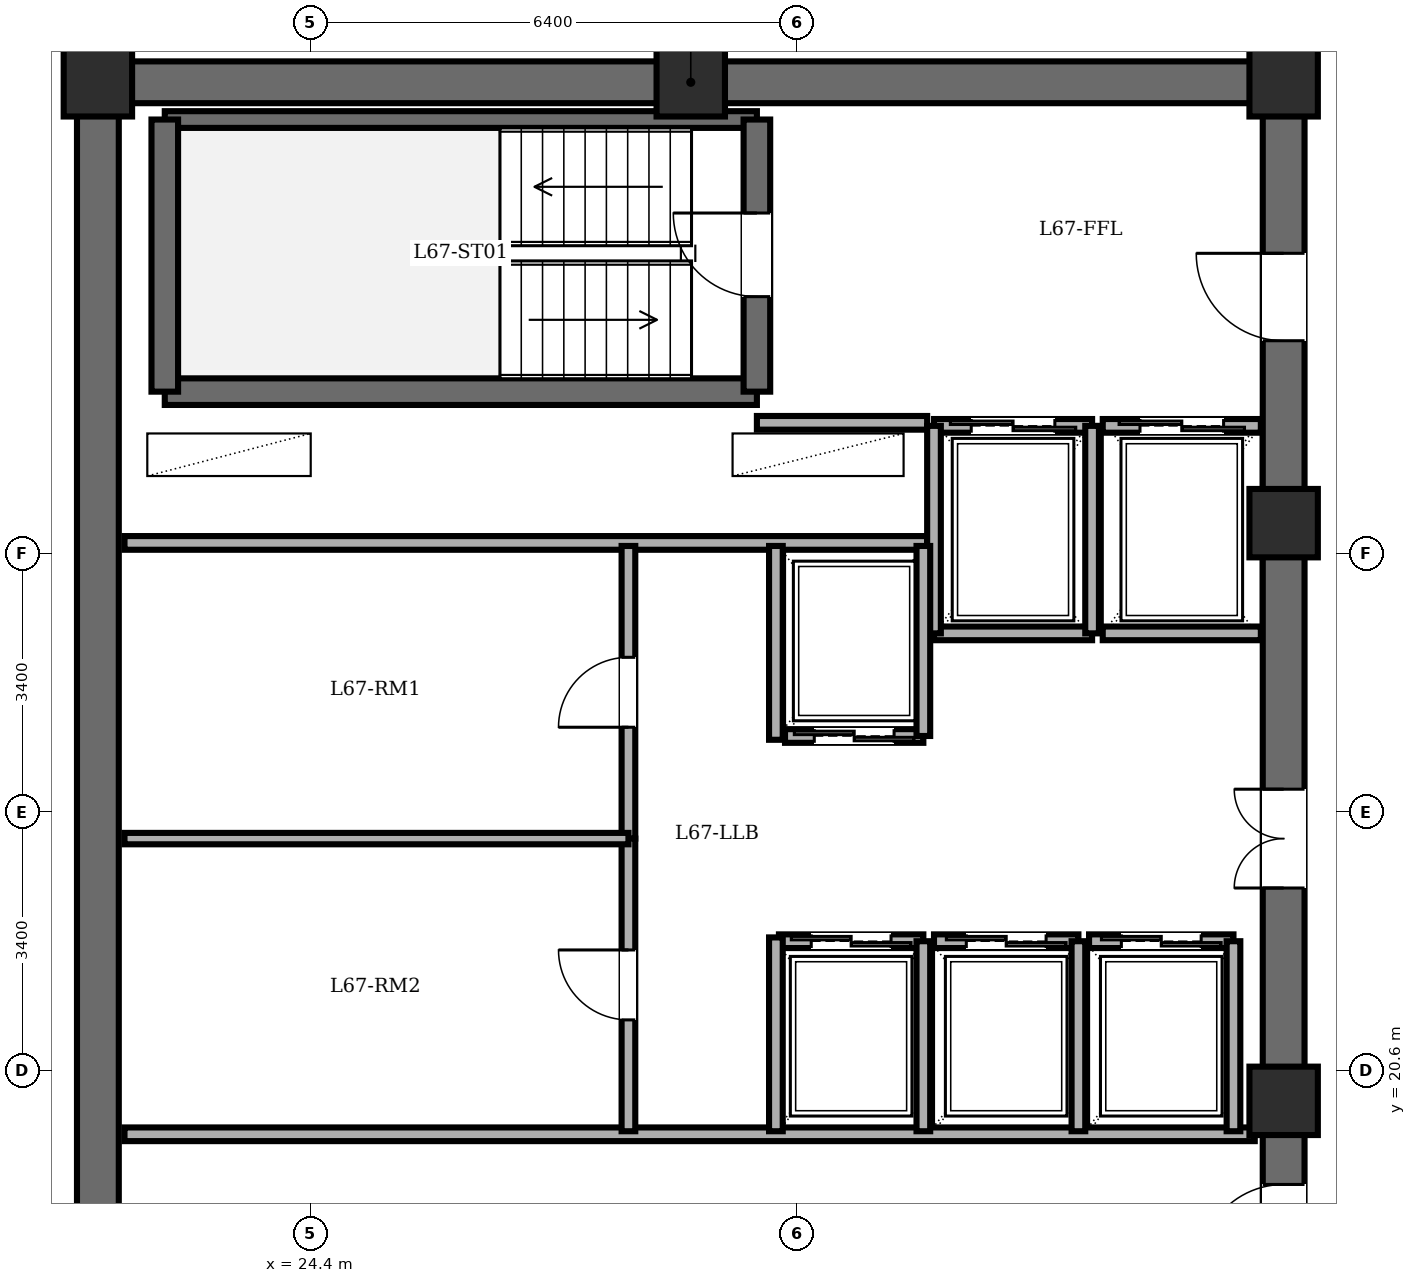
"""IFC4 building model, lengths in metres.
Left out: names, types, materials, properties, quantities, classifications, styles, units other than length and angle.
Written with IfcOpenShell. Run it as: python <this file> out.ifc"""

import sys

from ifc_helpers import new_model, si_unit, direction, frame, frame_2d, origin, origin_2d, place, context, subcontext, project, spatial, rectangle, extrude, element, fill, save


model = new_model("IFC4")
c1 = context("Model", 3, precision=1e-05, world=origin(), true_north=direction((0.0, 1.0)))
c2 = subcontext(c1, "Body", "Model", "MODEL_VIEW")
j1 = project(units=[si_unit("LENGTHUNIT", "METRE"), si_unit("PLANEANGLEUNIT", "RADIAN")], contexts=[c1])
p1 = place(None, origin())
s1 = spatial("IfcSite", under=j1, at=p1, CompositionType="ELEMENT")
p2 = place(p1, origin())
s2 = spatial("IfcBuilding", under=s1, at=p2, CompositionType="ELEMENT")
p3 = place(p2, frame((0.0, 0.0, 258.8)))
s3 = spatial("IfcBuildingStorey", under=s2, at=p3, CompositionType="ELEMENT", Elevation=258.8)
for number, where, z_axis, x_axis in (
    (1, (37.2, 20.2, 0.0), (0.0, 0.0, 1.0), (1.0, 0.0, 0.0)),
    (2, (37.2, 27.8, 0.0), (0.0, 0.0, 1.0), (1.0, 0.0, 0.0)),
    (3, (37.2, 33.6, 0.0), (0.0, 0.0, 1.0), (1.0, 0.0, 0.0)),
    (4, (29.4, 33.6, 0.0), (0.0, 0.0, 1.0), (1.0, 0.0, 0.0)),
    (5, (21.6, 33.6, 0.0), (0.0, 0.0, 1.0), (1.0, 0.0, 0.0)),
):
    element("IfcColumn", number, at=place(p3, frame(where, z_axis=z_axis, x_axis=x_axis)), inside=s3, PredefinedType="COLUMN", context=c2, shape_type="SweptSolid", body=[
        extrude(rectangle(XDim=0.9, YDim=0.9, at=origin_2d()), origin(), (0.0, 0.0, 1.0), 3.65),
    ])
p4 = place(p3, frame((21.6, 14.4, 0.0), z_axis=(0.0, 0.0, 1.0), x_axis=(0.0, 1.0, 0.0)))
e6 = element("IfcWall", 6, at=p4, inside=s3, PredefinedType="SHEAR", context=c2, shape_type="SweptSolid", body=[
    extrude(rectangle(XDim=19.2, YDim=0.55, at=frame_2d((9.6, 0.0))), origin(), (0.0, 0.0, 1.0), 3.45),
])
p5 = place(p3, frame((21.6, 33.6, 0.0), z_axis=(0.0, 0.0, 1.0), x_axis=(1.0, 0.0, 0.0)))
e7 = element("IfcWall", 7, at=p5, inside=s3, PredefinedType="SHEAR", context=c2, shape_type="SweptSolid", body=[
    extrude(rectangle(XDim=15.6, YDim=0.55, at=frame_2d((7.8, 0.0))), origin(), (0.0, 0.0, 1.0), 3.45),
])
p6 = place(p3, frame((37.2, 14.4, 0.0), z_axis=(0.0, 0.0, 1.0), x_axis=(0.0, 1.0, 0.0)))
e8 = element("IfcWall", 8, at=p6, inside=s3, PredefinedType="SHEAR", context=c2, shape_type="SweptSolid", body=[
    extrude(rectangle(XDim=19.2, YDim=0.55, at=frame_2d((9.6, 0.0))), origin(), (0.0, 0.0, 1.0), 3.45),
])
p7 = place(p6, frame((15.8, 0.0, 0.0)))
e9 = element("IfcOpeningElement", 9, at=p7, cuts=e8, PredefinedType="OPENING", context=c2, shape_type="SweptSolid", body=[
    extrude(rectangle(XDim=1.15, YDim=2.15, at=frame_2d((0.575, 1.075))), frame((0.0, 0.285, 0.0), z_axis=(0.0, -1.0, 0.0), x_axis=(1.0, 0.0, 0.0)), (0.0, 0.0, 1.0), 0.57),
])
p8 = place(p6, frame((3.6, 0.0, 0.0)))
e10 = element("IfcOpeningElement", 10, at=p8, cuts=e8, PredefinedType="OPENING", context=c2, shape_type="SweptSolid", body=[
    extrude(rectangle(XDim=1.1, YDim=2.15, at=frame_2d((0.55, 1.075))), frame((0.0, 0.285, 0.0), z_axis=(0.0, -1.0, 0.0), x_axis=(1.0, 0.0, 0.0)), (0.0, 0.0, 1.0), 0.57),
])
p9 = place(p6, frame((8.6, 0.0, 0.0)))
e11 = element("IfcOpeningElement", 11, at=p9, cuts=e8, PredefinedType="OPENING", context=c2, shape_type="SweptSolid", body=[
    extrude(rectangle(XDim=1.3, YDim=2.2, at=frame_2d((0.65, 1.1))), frame((0.0, 0.285, 0.0), z_axis=(0.0, -1.0, 0.0), x_axis=(1.0, 0.0, 0.0)), (0.0, 0.0, 1.0), 0.57),
])
p10 = place(p3, frame((22.48, 29.53, 0.0), z_axis=(0.0, 0.0, 1.0), x_axis=(1.0, 0.0, 0.0)))
e12 = element("IfcWall", 12, at=p10, inside=s3, PredefinedType="SOLIDWALL", context=c2, shape_type="SweptSolid", body=[
    extrude(rectangle(XDim=7.79, YDim=0.35, at=frame_2d((3.895, 0.0))), origin(), (0.0, 0.0, 1.0), 3.45),
])
p11 = place(p3, frame((22.48, 33.11, 0.0), z_axis=(0.0, 0.0, 1.0), x_axis=(1.0, 0.0, 0.0)))
e13 = element("IfcWall", 13, at=p11, inside=s3, PredefinedType="PARTITIONING", context=c2, shape_type="SweptSolid", body=[
    extrude(rectangle(XDim=7.79, YDim=0.22, at=frame_2d((3.895, 0.0))), origin(), (0.0, 0.0, 1.0), 3.45),
])
p12 = place(p3, frame((22.48, 29.53, 0.0), z_axis=(0.0, 0.0, 1.0), x_axis=(0.0, 1.0, 0.0)))
e14 = element("IfcWall", 14, at=p12, inside=s3, PredefinedType="SOLIDWALL", context=c2, shape_type="SweptSolid", body=[
    extrude(rectangle(XDim=3.58, YDim=0.35, at=frame_2d((1.79, 0.0))), origin(), (0.0, 0.0, 1.0), 3.45),
])
p13 = place(p3, frame((30.27, 29.53, 0.0), z_axis=(0.0, 0.0, 1.0), x_axis=(0.0, 1.0, 0.0)))
e15 = element("IfcWall", 15, at=p13, inside=s3, PredefinedType="SOLIDWALL", context=c2, shape_type="SweptSolid", body=[
    extrude(rectangle(XDim=3.58, YDim=0.35, at=frame_2d((1.79, 0.0))), origin(), (0.0, 0.0, 1.0), 3.45),
])
p14 = place(p13, frame((1.25, 0.0, 0.0)))
e16 = element("IfcOpeningElement", 16, at=p14, cuts=e15, PredefinedType="OPENING", context=c2, shape_type="SweptSolid", body=[
    extrude(rectangle(XDim=1.1, YDim=2.15, at=frame_2d((0.55, 1.075))), frame((0.0, 0.185, 0.0), z_axis=(0.0, -1.0, 0.0), x_axis=(1.0, 0.0, 0.0)), (0.0, 0.0, 1.0), 0.37),
])
p15 = place(p3, frame((30.27, 29.12, 0.0), z_axis=(0.0, 0.0, 1.0), x_axis=(1.0, 0.0, 0.0)))
e17 = element("IfcWall", 17, at=p15, inside=s3, PredefinedType="PARTITIONING", context=c2, shape_type="SweptSolid", body=[
    extrude(rectangle(XDim=2.24, YDim=0.18, at=frame_2d((1.12, 0.0))), origin(), (0.0, 0.0, 1.0), 3.45),
])
p16 = place(p3, frame((21.95, 27.54, 0.0), z_axis=(0.0, 0.0, 1.0), x_axis=(1.0, 0.0, 0.0)))
e18 = element("IfcWall", 18, at=p16, inside=s3, PredefinedType="PARTITIONING", context=c2, shape_type="SweptSolid", body=[
    extrude(rectangle(XDim=10.56, YDim=0.18, at=frame_2d((5.28, 0.0))), origin(), (0.0, 0.0, 1.0), 3.45),
])
p17 = place(p3, frame((21.95, 19.76, 0.0), z_axis=(0.0, 0.0, 1.0), x_axis=(1.0, 0.0, 0.0)))
e19 = element("IfcWall", 19, at=p17, inside=s3, PredefinedType="PARTITIONING", context=c2, shape_type="SweptSolid", body=[
    extrude(rectangle(XDim=14.87, YDim=0.18, at=frame_2d((7.435, 0.0))), origin(), (0.0, 0.0, 1.0), 3.45),
])
p18 = place(p3, frame((32.6, 29.08, 0.0), z_axis=(0.0, 0.0, 1.0), x_axis=(1.0, 0.0, 0.0)))
e20 = element("IfcWall", 20, at=p18, inside=s3, PredefinedType="PARTITIONING", context=c2, shape_type="SweptSolid", body=[
    extrude(rectangle(XDim=2.08, YDim=0.18, at=frame_2d((1.04, 0.0))), origin(), (0.0, 0.0, 1.0), 3.45),
])
p19 = place(p18, frame((0.49, 0.0, 0.0)))
e21 = element("IfcOpeningElement", 21, at=p19, cuts=e20, PredefinedType="OPENING", context=c2, shape_type="SweptSolid", body=[
    extrude(rectangle(XDim=1.1, YDim=2.2, at=frame_2d((0.55, 1.1))), frame((0.0, 0.1, 0.0), z_axis=(0.0, -1.0, 0.0), x_axis=(1.0, 0.0, 0.0)), (0.0, 0.0, 1.0), 0.2),
])
p20 = place(p3, frame((34.68, 26.35, 0.0), z_axis=(0.0, 0.0, 1.0), x_axis=(-1.0, 0.0, 0.0)))
e22 = element("IfcWall", 22, at=p20, inside=s3, PredefinedType="PARTITIONING", context=c2, shape_type="SweptSolid", body=[
    extrude(rectangle(XDim=2.08, YDim=0.18, at=frame_2d((1.04, 0.0))), origin(), (0.0, 0.0, 1.0), 3.45),
])
for number, where, z_axis, x_axis in (
    (23, (34.68, 26.35, 0.0), (0.0, 0.0, 1.0), (0.0, 1.0, 0.0)),
    (24, (32.6, 29.08, 0.0), (0.0, 0.0, 1.0), (0.0, -1.0, 0.0)),
):
    element("IfcWall", number, at=place(p3, frame(where, z_axis=z_axis, x_axis=x_axis)), inside=s3, PredefinedType="PARTITIONING", context=c2, shape_type="SweptSolid", body=[
        extrude(rectangle(XDim=2.73, YDim=0.18, at=frame_2d((1.365, 0.0))), origin(), (0.0, 0.0, 1.0), 3.45),
    ])
p21 = place(p3, frame((34.82, 29.08, 0.0), z_axis=(0.0, 0.0, 1.0), x_axis=(1.0, 0.0, 0.0)))
e25 = element("IfcWall", 25, at=p21, inside=s3, PredefinedType="PARTITIONING", context=c2, shape_type="SweptSolid", body=[
    extrude(rectangle(XDim=2.08, YDim=0.18, at=frame_2d((1.04, 0.0))), origin(), (0.0, 0.0, 1.0), 3.45),
])
p22 = place(p21, frame((0.49, 0.0, 0.0)))
e26 = element("IfcOpeningElement", 26, at=p22, cuts=e25, PredefinedType="OPENING", context=c2, shape_type="SweptSolid", body=[
    extrude(rectangle(XDim=1.1, YDim=2.2, at=frame_2d((0.55, 1.1))), frame((0.0, 0.1, 0.0), z_axis=(0.0, -1.0, 0.0), x_axis=(1.0, 0.0, 0.0)), (0.0, 0.0, 1.0), 0.2),
])
p23 = place(p3, frame((36.9, 26.35, 0.0), z_axis=(0.0, 0.0, 1.0), x_axis=(-1.0, 0.0, 0.0)))
e27 = element("IfcWall", 27, at=p23, inside=s3, PredefinedType="PARTITIONING", context=c2, shape_type="SweptSolid", body=[
    extrude(rectangle(XDim=2.08, YDim=0.18, at=frame_2d((1.04, 0.0))), origin(), (0.0, 0.0, 1.0), 3.45),
])
p24 = place(p3, frame((32.46, 25.0, 0.0), z_axis=(0.0, 0.0, 1.0), x_axis=(-1.0, 0.0, 0.0)))
e28 = element("IfcWall", 28, at=p24, inside=s3, PredefinedType="PARTITIONING", context=c2, shape_type="SweptSolid", body=[
    extrude(rectangle(XDim=1.82, YDim=0.18, at=frame_2d((0.91, 0.0))), origin(), (0.0, 0.0, 1.0), 3.45),
])
p25 = place(p24, frame((0.385, 0.0, 0.0)))
e29 = element("IfcOpeningElement", 29, at=p25, cuts=e28, PredefinedType="OPENING", context=c2, shape_type="SweptSolid", body=[
    extrude(rectangle(XDim=1.05, YDim=2.2, at=frame_2d((0.525, 1.1))), frame((0.0, 0.1, 0.0), z_axis=(0.0, -1.0, 0.0), x_axis=(1.0, 0.0, 0.0)), (0.0, 0.0, 1.0), 0.2),
])
p26 = place(p3, frame((32.46, 25.0, 0.0), z_axis=(0.0, 0.0, 1.0), x_axis=(0.0, 1.0, 0.0)))
e30 = element("IfcWall", 30, at=p26, inside=s3, PredefinedType="PARTITIONING", context=c2, shape_type="SweptSolid", body=[
    extrude(rectangle(XDim=2.5, YDim=0.18, at=frame_2d((1.25, 0.0))), origin(), (0.0, 0.0, 1.0), 3.45),
])
p27 = place(p3, frame((30.56, 22.3, 0.0), z_axis=(0.0, 0.0, 1.0), x_axis=(1.0, 0.0, 0.0)))
e31 = element("IfcWall", 31, at=p27, inside=s3, PredefinedType="PARTITIONING", context=c2, shape_type="SweptSolid", body=[
    extrude(rectangle(XDim=1.9, YDim=0.18, at=frame_2d((0.95, 0.0))), origin(), (0.0, 0.0, 1.0), 3.45),
])
p28 = place(p27, frame((0.425, 0.0, 0.0)))
e32 = element("IfcOpeningElement", 32, at=p28, cuts=e31, PredefinedType="OPENING", context=c2, shape_type="SweptSolid", body=[
    extrude(rectangle(XDim=1.05, YDim=2.2, at=frame_2d((0.525, 1.1))), frame((0.0, 0.1, 0.0), z_axis=(0.0, -1.0, 0.0), x_axis=(1.0, 0.0, 0.0)), (0.0, 0.0, 1.0), 0.2),
])
p29 = place(p3, frame((32.46, 19.8, 0.0), z_axis=(0.0, 0.0, 1.0), x_axis=(0.0, 1.0, 0.0)))
e33 = element("IfcWall", 33, at=p29, inside=s3, PredefinedType="PARTITIONING", context=c2, shape_type="SweptSolid", body=[
    extrude(rectangle(XDim=2.5, YDim=0.18, at=frame_2d((1.25, 0.0))), origin(), (0.0, 0.0, 1.0), 3.45),
])
p30 = place(p3, frame((32.6, 22.3, 0.0), z_axis=(0.0, 0.0, 1.0), x_axis=(1.0, 0.0, 0.0)))
e34 = element("IfcWall", 34, at=p30, inside=s3, PredefinedType="PARTITIONING", context=c2, shape_type="SweptSolid", body=[
    extrude(rectangle(XDim=1.9, YDim=0.18, at=frame_2d((0.95, 0.0))), origin(), (0.0, 0.0, 1.0), 3.45),
])
p31 = place(p30, frame((0.425, 0.0, 0.0)))
e35 = element("IfcOpeningElement", 35, at=p31, cuts=e34, PredefinedType="OPENING", context=c2, shape_type="SweptSolid", body=[
    extrude(rectangle(XDim=1.05, YDim=2.2, at=frame_2d((0.525, 1.1))), frame((0.0, 0.1, 0.0), z_axis=(0.0, -1.0, 0.0), x_axis=(1.0, 0.0, 0.0)), (0.0, 0.0, 1.0), 0.2),
])
p32 = place(p3, frame((34.5, 19.8, 0.0), z_axis=(0.0, 0.0, 1.0), x_axis=(0.0, 1.0, 0.0)))
e36 = element("IfcWall", 36, at=p32, inside=s3, PredefinedType="PARTITIONING", context=c2, shape_type="SweptSolid", body=[
    extrude(rectangle(XDim=2.5, YDim=0.18, at=frame_2d((1.25, 0.0))), origin(), (0.0, 0.0, 1.0), 3.45),
])
p33 = place(p3, frame((34.64, 22.3, 0.0), z_axis=(0.0, 0.0, 1.0), x_axis=(1.0, 0.0, 0.0)))
e37 = element("IfcWall", 37, at=p33, inside=s3, PredefinedType="PARTITIONING", context=c2, shape_type="SweptSolid", body=[
    extrude(rectangle(XDim=1.9, YDim=0.18, at=frame_2d((0.95, 0.0))), origin(), (0.0, 0.0, 1.0), 3.45),
])
p34 = place(p33, frame((0.425, 0.0, 0.0)))
e38 = element("IfcOpeningElement", 38, at=p34, cuts=e37, PredefinedType="OPENING", context=c2, shape_type="SweptSolid", body=[
    extrude(rectangle(XDim=1.05, YDim=2.2, at=frame_2d((0.525, 1.1))), frame((0.0, 0.1, 0.0), z_axis=(0.0, -1.0, 0.0), x_axis=(1.0, 0.0, 0.0)), (0.0, 0.0, 1.0), 0.2),
])
p35 = place(p3, frame((36.54, 19.8, 0.0), z_axis=(0.0, 0.0, 1.0), x_axis=(0.0, 1.0, 0.0)))
e39 = element("IfcWall", 39, at=p35, inside=s3, PredefinedType="PARTITIONING", context=c2, shape_type="SweptSolid", body=[
    extrude(rectangle(XDim=2.5, YDim=0.18, at=frame_2d((1.25, 0.0))), origin(), (0.0, 0.0, 1.0), 3.45),
])
for number, where, z_axis, x_axis in (
    (40, (30.52, 24.95, 0.0), (0.0, 0.0, 1.0), (0.0, 1.0, 0.0)),
    (41, (30.52, 19.8, 0.0), (0.0, 0.0, 1.0), (0.0, 1.0, 0.0)),
):
    element("IfcWall", number, at=place(p3, frame(where, z_axis=z_axis, x_axis=x_axis)), inside=s3, PredefinedType="PARTITIONING", context=c2, shape_type="SweptSolid", body=[
        extrude(rectangle(XDim=2.55, YDim=0.18, at=frame_2d((1.275, 0.0))), origin(), (0.0, 0.0, 1.0), 3.45),
    ])
p36 = place(p3, frame((28.58, 23.65, 0.0), z_axis=(0.0, 0.0, 1.0), x_axis=(0.0, 1.0, 0.0)))
e42 = element("IfcWall", 42, at=p36, inside=s3, PredefinedType="PARTITIONING", context=c2, shape_type="SweptSolid", body=[
    extrude(rectangle(XDim=3.85, YDim=0.18, at=frame_2d((1.925, 0.0))), origin(), (0.0, 0.0, 1.0), 3.45),
])
p37 = place(p36, frame((1.465, 0.0, 0.0)))
e43 = element("IfcOpeningElement", 43, at=p37, cuts=e42, PredefinedType="OPENING", context=c2, shape_type="SweptSolid", body=[
    extrude(rectangle(XDim=0.92, YDim=2.1, at=frame_2d((0.46, 1.05))), frame((0.0, 0.1, 0.0), z_axis=(0.0, -1.0, 0.0), x_axis=(1.0, 0.0, 0.0)), (0.0, 0.0, 1.0), 0.2),
])
p38 = place(p3, frame((28.58, 19.8, 0.0), z_axis=(0.0, 0.0, 1.0), x_axis=(0.0, 1.0, 0.0)))
e44 = element("IfcWall", 44, at=p38, inside=s3, PredefinedType="PARTITIONING", context=c2, shape_type="SweptSolid", body=[
    extrude(rectangle(XDim=3.85, YDim=0.18, at=frame_2d((1.925, 0.0))), origin(), (0.0, 0.0, 1.0), 3.45),
])
p39 = place(p38, frame((1.465, 0.0, 0.0)))
e45 = element("IfcOpeningElement", 45, at=p39, cuts=e44, PredefinedType="OPENING", context=c2, shape_type="SweptSolid", body=[
    extrude(rectangle(XDim=0.92, YDim=2.1, at=frame_2d((0.46, 1.05))), frame((0.0, 0.1, 0.0), z_axis=(0.0, -1.0, 0.0), x_axis=(1.0, 0.0, 0.0)), (0.0, 0.0, 1.0), 0.2),
])
p40 = place(p3, frame((21.95, 23.65, 0.0), z_axis=(0.0, 0.0, 1.0), x_axis=(1.0, 0.0, 0.0)))
e46 = element("IfcWall", 46, at=p40, inside=s3, PredefinedType="PARTITIONING", context=c2, shape_type="SweptSolid", body=[
    extrude(rectangle(XDim=6.63, YDim=0.15, at=frame_2d((3.315, 0.0))), origin(), (0.0, 0.0, 1.0), 3.45),
])
p41 = place(p14, origin())
e47 = element("IfcDoor", 47, at=p41, inside=s3, OperationType="SINGLE_SWING_RIGHT", PredefinedType="DOOR", context=c2, shape_type="SweptSolid", body=[
    extrude(rectangle(XDim=1.1, YDim=2.15, at=frame_2d((0.55, 1.075))), frame((0.0, 0.025, 0.0), z_axis=(0.0, -1.0, 0.0), x_axis=(1.0, 0.0, 0.0)), (0.0, 0.0, 1.0), 0.05),
])
fill(e16, e47)
p42 = place(p7, origin())
e48 = element("IfcDoor", 48, at=p42, inside=s3, OperationType="SINGLE_SWING_RIGHT", PredefinedType="DOOR", context=c2, shape_type="SweptSolid", body=[
    extrude(rectangle(XDim=1.15, YDim=2.15, at=frame_2d((0.575, 1.075))), frame((0.0, 0.025, 0.0), z_axis=(0.0, -1.0, 0.0), x_axis=(1.0, 0.0, 0.0)), (0.0, 0.0, 1.0), 0.05),
])
fill(e9, e48)
p43 = place(p8, origin())
e49 = element("IfcDoor", 49, at=p43, inside=s3, OperationType="SINGLE_SWING_LEFT", PredefinedType="DOOR", context=c2, shape_type="SweptSolid", body=[
    extrude(rectangle(XDim=1.1, YDim=2.15, at=frame_2d((0.55, 1.075))), frame((0.0, 0.025, 0.0), z_axis=(0.0, -1.0, 0.0), x_axis=(1.0, 0.0, 0.0)), (0.0, 0.0, 1.0), 0.05),
])
fill(e10, e49)
p44 = place(p19, origin())
e50 = element("IfcDoor", 50, at=p44, inside=s3, OperationType="DOUBLE_DOOR_SLIDING", PredefinedType="DOOR", context=c2, shape_type="SweptSolid", body=[
    extrude(rectangle(XDim=1.1, YDim=2.2, at=frame_2d((0.55, 1.1))), frame((0.0, 0.025, 0.0), z_axis=(0.0, -1.0, 0.0), x_axis=(1.0, 0.0, 0.0)), (0.0, 0.0, 1.0), 0.05),
])
fill(e21, e50)
p45 = place(p22, origin())
e51 = element("IfcDoor", 51, at=p45, inside=s3, OperationType="DOUBLE_DOOR_SLIDING", PredefinedType="DOOR", context=c2, shape_type="SweptSolid", body=[
    extrude(rectangle(XDim=1.1, YDim=2.2, at=frame_2d((0.55, 1.1))), frame((0.0, 0.025, 0.0), z_axis=(0.0, -1.0, 0.0), x_axis=(1.0, 0.0, 0.0)), (0.0, 0.0, 1.0), 0.05),
])
fill(e26, e51)
p46 = place(p25, origin())
e52 = element("IfcDoor", 52, at=p46, inside=s3, OperationType="DOUBLE_DOOR_SLIDING", PredefinedType="DOOR", context=c2, shape_type="SweptSolid", body=[
    extrude(rectangle(XDim=1.05, YDim=2.2, at=frame_2d((0.525, 1.1))), frame((0.0, 0.025, 0.0), z_axis=(0.0, -1.0, 0.0), x_axis=(1.0, 0.0, 0.0)), (0.0, 0.0, 1.0), 0.05),
])
fill(e29, e52)
p47 = place(p28, origin())
e53 = element("IfcDoor", 53, at=p47, inside=s3, OperationType="DOUBLE_DOOR_SLIDING", PredefinedType="DOOR", context=c2, shape_type="SweptSolid", body=[
    extrude(rectangle(XDim=1.05, YDim=2.2, at=frame_2d((0.525, 1.1))), frame((0.0, 0.025, 0.0), z_axis=(0.0, -1.0, 0.0), x_axis=(1.0, 0.0, 0.0)), (0.0, 0.0, 1.0), 0.05),
])
fill(e32, e53)
p48 = place(p31, origin())
e54 = element("IfcDoor", 54, at=p48, inside=s3, OperationType="DOUBLE_DOOR_SLIDING", PredefinedType="DOOR", context=c2, shape_type="SweptSolid", body=[
    extrude(rectangle(XDim=1.05, YDim=2.2, at=frame_2d((0.525, 1.1))), frame((0.0, 0.025, 0.0), z_axis=(0.0, -1.0, 0.0), x_axis=(1.0, 0.0, 0.0)), (0.0, 0.0, 1.0), 0.05),
])
fill(e35, e54)
p49 = place(p34, origin())
e55 = element("IfcDoor", 55, at=p49, inside=s3, OperationType="DOUBLE_DOOR_SLIDING", PredefinedType="DOOR", context=c2, shape_type="SweptSolid", body=[
    extrude(rectangle(XDim=1.05, YDim=2.2, at=frame_2d((0.525, 1.1))), frame((0.0, 0.025, 0.0), z_axis=(0.0, -1.0, 0.0), x_axis=(1.0, 0.0, 0.0)), (0.0, 0.0, 1.0), 0.05),
])
fill(e38, e55)
p50 = place(p37, origin())
e56 = element("IfcDoor", 56, at=p50, inside=s3, OperationType="SINGLE_SWING_LEFT", PredefinedType="DOOR", context=c2, shape_type="SweptSolid", body=[
    extrude(rectangle(XDim=0.92, YDim=2.1, at=frame_2d((0.46, 1.05))), frame((0.0, 0.025, 0.0), z_axis=(0.0, -1.0, 0.0), x_axis=(1.0, 0.0, 0.0)), (0.0, 0.0, 1.0), 0.05),
])
fill(e43, e56)
p51 = place(p39, origin())
e57 = element("IfcDoor", 57, at=p51, inside=s3, OperationType="SINGLE_SWING_RIGHT", PredefinedType="DOOR", context=c2, shape_type="SweptSolid", body=[
    extrude(rectangle(XDim=0.92, YDim=2.1, at=frame_2d((0.46, 1.05))), frame((0.0, 0.025, 0.0), z_axis=(0.0, -1.0, 0.0), x_axis=(1.0, 0.0, 0.0)), (0.0, 0.0, 1.0), 0.05),
])
fill(e45, e57)
p52 = place(p9, origin())
e58 = element("IfcDoor", 58, at=p52, inside=s3, OperationType="DOUBLE_DOOR_SINGLE_SWING", PredefinedType="DOOR", context=c2, shape_type="SweptSolid", body=[
    extrude(rectangle(XDim=1.3, YDim=2.2, at=frame_2d((0.65, 1.1))), frame((0.0, 0.025, 0.0), z_axis=(0.0, -1.0, 0.0), x_axis=(1.0, 0.0, 0.0)), (0.0, 0.0, 1.0), 0.05),
])
fill(e11, e58)
save(model, sys.argv[1])
